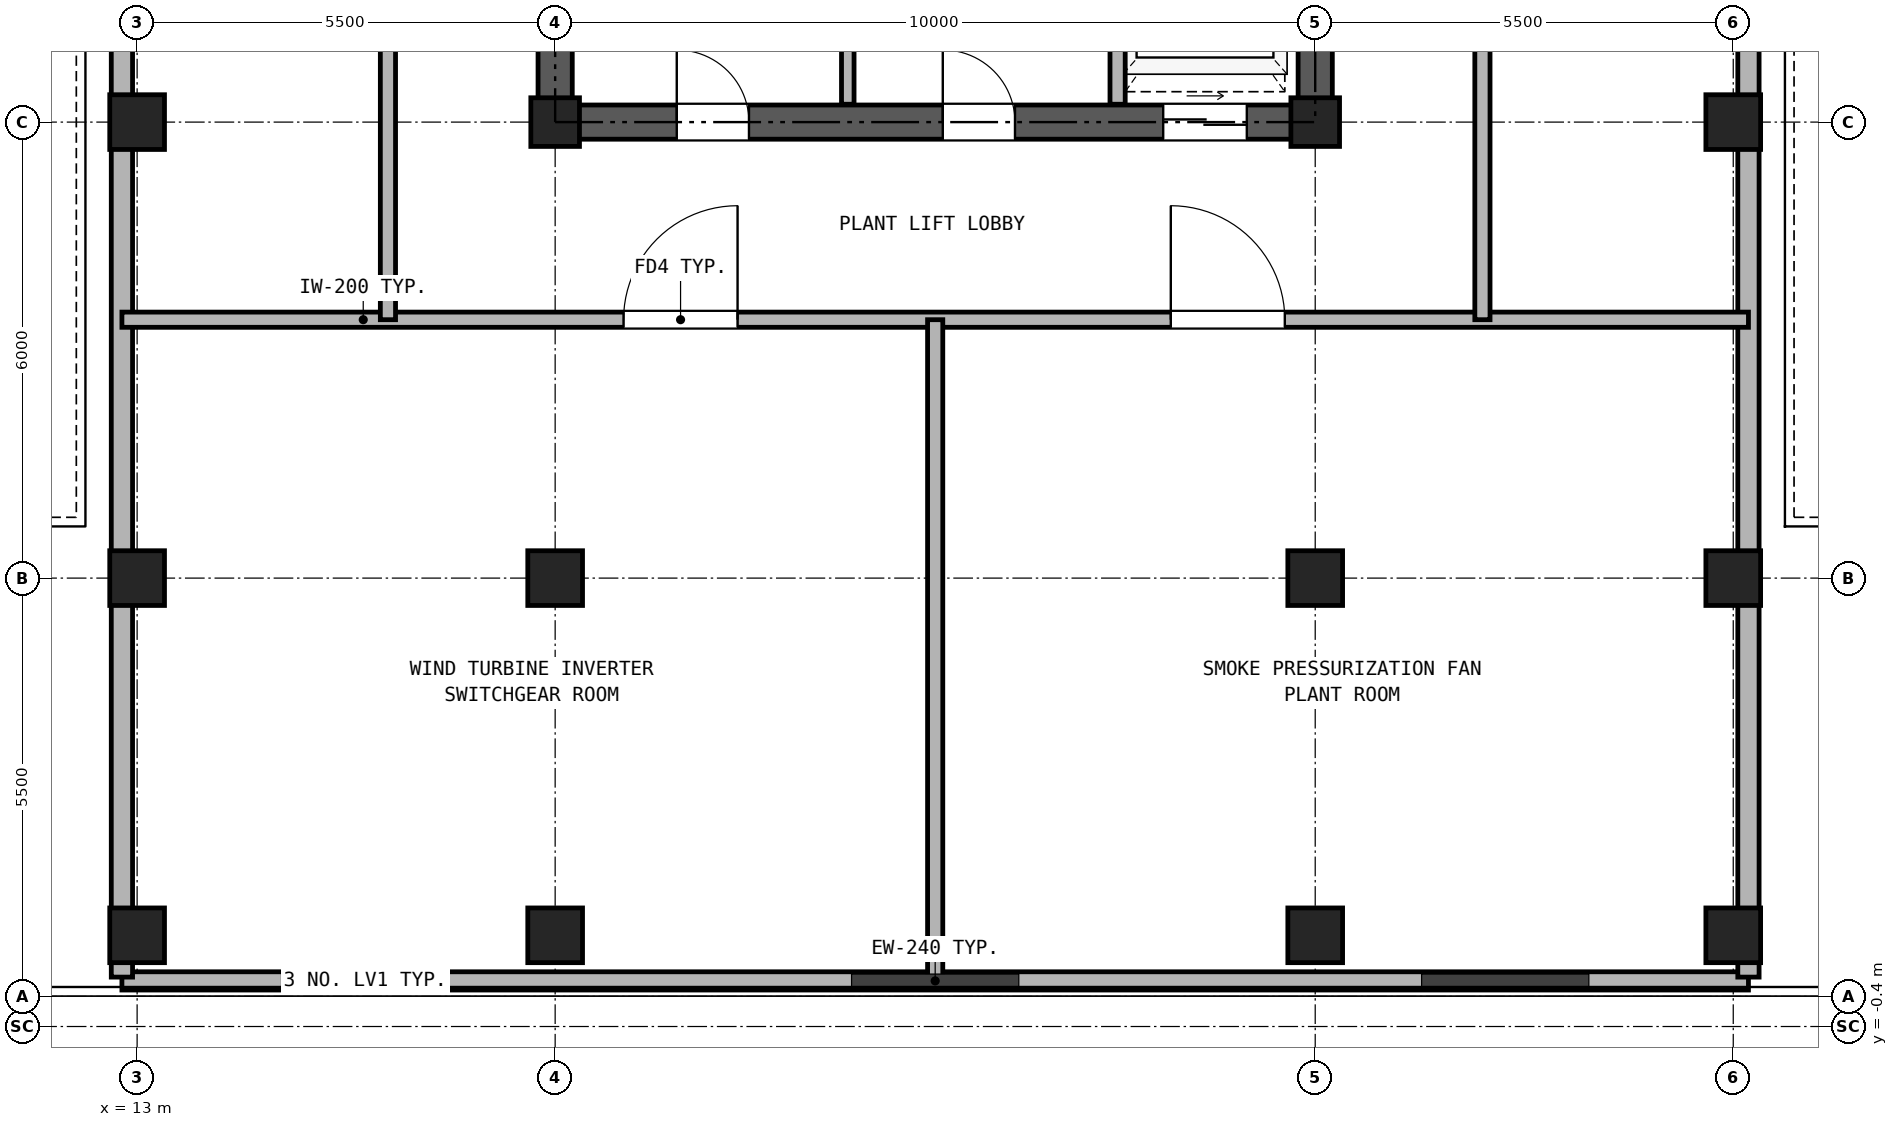
"""IFC4 building model, lengths in metres.
Left out: names, types, materials, properties, quantities, classifications, styles, units other than length and angle.
Written with IfcOpenShell. Run it as: python <this file> out.ifc"""

import sys

from ifc_helpers import new_model, si_unit, direction, frame, frame_2d, origin, origin_2d, place, context, subcontext, project, spatial, rectangle, hollow_rectangle, extrude, source, transform, mapped, element, fill, save


model = new_model("IFC4")
c1 = context("Model", 3, precision=1e-05, world=origin(), true_north=direction((0.0, 1.0)))
c2 = subcontext(c1, "Body", "Model", "MODEL_VIEW")
j1 = project(units=[si_unit("LENGTHUNIT", "METRE"), si_unit("PLANEANGLEUNIT", "RADIAN")], contexts=[c1])
p1 = place(None, origin())
s1 = spatial("IfcSite", under=j1, at=p1, CompositionType="ELEMENT")
p2 = place(p1, origin())
s2 = spatial("IfcBuilding", under=s1, at=p2, CompositionType="ELEMENT")
p3 = place(p2, frame((0.0, 0.0, 188.1)))
s3 = spatial("IfcBuildingStorey", under=s2, at=p3, CompositionType="ELEMENT", Elevation=188.1)
m1 = source(origin(), c2, "Body", "SweptSolid", [
    extrude(hollow_rectangle(XDim=0.72, YDim=0.72, WallThickness=0.04, at=origin_2d()), origin(), (0.0, 0.0, 1.0), 4.85),
])
for number, where, z_axis, x_axis in (
    (1, (13.0, 0.8, 0.0), (0.0, 0.0, 1.0), (1.0, 0.0, 0.0)),
    (2, (18.5, 0.8, 0.0), (0.0, 0.0, 1.0), (1.0, 0.0, 0.0)),
    (3, (28.5, 0.8, 0.0), (0.0, 0.0, 1.0), (1.0, 0.0, 0.0)),
    (4, (34.0, 0.8, 0.0), (0.0, 0.0, 1.0), (1.0, 0.0, 0.0)),
    (5, (13.0, 5.5, 0.0), (0.0, 0.0, 1.0), (1.0, 0.0, 0.0)),
    (6, (13.0, 11.5, 0.0), (0.0, 0.0, 1.0), (1.0, 0.0, 0.0)),
    (7, (18.5, 5.5, 0.0), (0.0, 0.0, 1.0), (1.0, 0.0, 0.0)),
):
    element("IfcColumn", number, at=place(p3, frame(where, z_axis=z_axis, x_axis=x_axis)), inside=s3, PredefinedType="COLUMN", context=c2, shape_type="MappedRepresentation", body=[
        mapped(m1, transform((0.0, 0.0, 0.0), x_axis=(1.0, 0.0, 0.0), y_axis=(0.0, 1.0, 0.0), z_axis=(0.0, 0.0, 1.0), scale=1.0)),
    ])
m2 = source(origin(), c2, "Body", "SweptSolid", [
    extrude(hollow_rectangle(XDim=0.64, YDim=0.64, WallThickness=0.035, at=origin_2d()), origin(), (0.0, 0.0, 1.0), 4.85),
])
p4 = place(p3, frame((18.5, 11.5, 0.0), z_axis=(0.0, 0.0, 1.0), x_axis=(1.0, 0.0, 0.0)))
e8 = element("IfcColumn", 8, at=p4, inside=s3, PredefinedType="COLUMN", context=c2, shape_type="MappedRepresentation", body=[
    mapped(m2, transform((0.0, 0.0, 0.0), x_axis=(1.0, 0.0, 0.0), y_axis=(0.0, 1.0, 0.0), z_axis=(0.0, 0.0, 1.0), scale=1.0)),
])
p5 = place(p3, frame((28.5, 5.5, 0.0), z_axis=(0.0, 0.0, 1.0), x_axis=(1.0, 0.0, 0.0)))
e9 = element("IfcColumn", 9, at=p5, inside=s3, PredefinedType="COLUMN", context=c2, shape_type="MappedRepresentation", body=[
    mapped(m1, transform((0.0, 0.0, 0.0), x_axis=(1.0, 0.0, 0.0), y_axis=(0.0, 1.0, 0.0), z_axis=(0.0, 0.0, 1.0), scale=1.0)),
])
p6 = place(p3, frame((28.5, 11.5, 0.0), z_axis=(0.0, 0.0, 1.0), x_axis=(1.0, 0.0, 0.0)))
e10 = element("IfcColumn", 10, at=p6, inside=s3, PredefinedType="COLUMN", context=c2, shape_type="MappedRepresentation", body=[
    mapped(m2, transform((0.0, 0.0, 0.0), x_axis=(1.0, 0.0, 0.0), y_axis=(0.0, 1.0, 0.0), z_axis=(0.0, 0.0, 1.0), scale=1.0)),
])
for number, where, z_axis, x_axis in (
    (11, (34.0, 5.5, 0.0), (0.0, 0.0, 1.0), (1.0, 0.0, 0.0)),
    (12, (34.0, 11.5, 0.0), (0.0, 0.0, 1.0), (1.0, 0.0, 0.0)),
):
    element("IfcColumn", number, at=place(p3, frame(where, z_axis=z_axis, x_axis=x_axis)), inside=s3, PredefinedType="COLUMN", context=c2, shape_type="MappedRepresentation", body=[
        mapped(m1, transform((0.0, 0.0, 0.0), x_axis=(1.0, 0.0, 0.0), y_axis=(0.0, 1.0, 0.0), z_axis=(0.0, 0.0, 1.0), scale=1.0)),
    ])
p7 = place(p3, frame((12.8, 0.2, 0.0), z_axis=(0.0, 0.0, 1.0), x_axis=(1.0, 0.0, 0.0)))
e13 = element("IfcWall", 13, at=p7, inside=s3, PredefinedType="SOLIDWALL", context=c2, shape_type="SweptSolid", body=[
    extrude(rectangle(XDim=21.4, YDim=0.24, at=frame_2d((10.7, 0.0))), origin(), (0.0, 0.0, 1.0), 4.85),
])
p8 = place(p3, frame((18.275, 11.5, 0.0), z_axis=(0.0, 0.0, 1.0), x_axis=(1.0, 0.0, 0.0)))
e14 = element("IfcWall", 14, at=p8, inside=s3, PredefinedType="SHEAR", context=c2, shape_type="SweptSolid", body=[
    extrude(rectangle(XDim=10.45, YDim=0.45, at=frame_2d((5.225, 0.0))), origin(), (0.0, 0.0, 1.0), 4.85),
])
p9 = place(p8, frame((1.825, 0.0, 0.0)))
e15 = element("IfcOpeningElement", 15, at=p9, cuts=e14, PredefinedType="OPENING", context=c2, shape_type="SweptSolid", body=[
    extrude(rectangle(XDim=0.95, YDim=2.15, at=frame_2d((0.475, 1.075))), frame((0.0, 0.235, 0.0), z_axis=(0.0, -1.0, 0.0), x_axis=(1.0, 0.0, 0.0)), (0.0, 0.0, 1.0), 0.47),
])
p10 = place(p8, frame((5.325, 0.0, 0.0)))
e16 = element("IfcOpeningElement", 16, at=p10, cuts=e14, PredefinedType="OPENING", context=c2, shape_type="SweptSolid", body=[
    extrude(rectangle(XDim=0.95, YDim=2.15, at=frame_2d((0.475, 1.075))), frame((0.0, 0.235, 0.0), z_axis=(0.0, -1.0, 0.0), x_axis=(1.0, 0.0, 0.0)), (0.0, 0.0, 1.0), 0.47),
])
p11 = place(p8, frame((8.225, 0.0, 0.0)))
e17 = element("IfcOpeningElement", 17, at=p11, cuts=e14, PredefinedType="OPENING", context=c2, shape_type="SweptSolid", body=[
    extrude(rectangle(XDim=1.1, YDim=2.25, at=frame_2d((0.55, 1.125))), frame((0.0, 0.235, 0.0), z_axis=(0.0, -1.0, 0.0), x_axis=(1.0, 0.0, 0.0)), (0.0, 0.0, 1.0), 0.47),
])
p12 = place(p3, frame((18.5, 11.725, 0.0), z_axis=(0.0, 0.0, 1.0), x_axis=(0.0, 1.0, 0.0)))
e18 = element("IfcWall", 18, at=p12, inside=s3, PredefinedType="SHEAR", context=c2, shape_type="SweptSolid", body=[
    extrude(rectangle(XDim=16.8, YDim=0.45, at=frame_2d((8.4, 0.0))), origin(), (0.0, 0.0, 1.0), 4.85),
])
p13 = place(p12, frame((7.425, 0.0, 0.0)))
e19 = element("IfcOpeningElement", 19, at=p13, cuts=e18, PredefinedType="OPENING", context=c2, shape_type="SweptSolid", body=[
    extrude(rectangle(XDim=1.15, YDim=2.2, at=frame_2d((0.575, 1.1))), frame((0.0, 0.235, 0.0), z_axis=(0.0, -1.0, 0.0), x_axis=(1.0, 0.0, 0.0)), (0.0, 0.0, 1.0), 0.47),
])
p14 = place(p3, frame((28.5, 11.725, 0.0), z_axis=(0.0, 0.0, 1.0), x_axis=(0.0, 1.0, 0.0)))
e20 = element("IfcWall", 20, at=p14, inside=s3, PredefinedType="SHEAR", context=c2, shape_type="SweptSolid", body=[
    extrude(rectangle(XDim=16.8, YDim=0.45, at=frame_2d((8.4, 0.0))), origin(), (0.0, 0.0, 1.0), 4.85),
])
p15 = place(p14, frame((7.425, 0.0, 0.0)))
e21 = element("IfcOpeningElement", 21, at=p15, cuts=e20, PredefinedType="OPENING", context=c2, shape_type="SweptSolid", body=[
    extrude(rectangle(XDim=1.15, YDim=2.2, at=frame_2d((0.575, 1.1))), frame((0.0, 0.235, 0.0), z_axis=(0.0, -1.0, 0.0), x_axis=(1.0, 0.0, 0.0)), (0.0, 0.0, 1.0), 0.47),
])
p16 = place(p3, frame((22.35, 11.735, 0.0), z_axis=(0.0, 0.0, 1.0), x_axis=(0.0, 1.0, 0.0)))
e22 = element("IfcWall", 22, at=p16, inside=s3, PredefinedType="PARTITIONING", context=c2, shape_type="SweptSolid", body=[
    extrude(rectangle(XDim=3.265, YDim=0.165, at=frame_2d((1.632, 0.0))), origin(), (0.0, 0.0, 1.0), 4.85),
])
p17 = place(p3, frame((25.9, 11.735, 0.0), z_axis=(0.0, 0.0, 1.0), x_axis=(0.0, 1.0, 0.0)))
e23 = element("IfcWall", 23, at=p17, inside=s3, PredefinedType="PARTITIONING", context=c2, shape_type="SweptSolid", body=[
    extrude(rectangle(XDim=3.265, YDim=0.2, at=frame_2d((1.632, 0.0))), origin(), (0.0, 0.0, 1.0), 4.85),
])
for number, where, z_axis, x_axis in (
    (24, (12.8, 0.25, 0.0), (0.0, 0.0, 1.0), (0.0, 1.0, 0.0)),
    (25, (34.2, 0.25, 0.0), (0.0, 0.0, 1.0), (0.0, 1.0, 0.0)),
):
    element("IfcWall", number, at=place(p3, frame(where, z_axis=z_axis, x_axis=x_axis)), inside=s3, PredefinedType="SOLIDWALL", context=c2, shape_type="SweptSolid", body=[
        extrude(rectangle(XDim=34.8, YDim=0.28, at=frame_2d((17.4, 0.0))), origin(), (0.0, 0.0, 1.0), 4.223),
    ])
p18 = place(p3, frame((12.8, 8.9, 0.0), z_axis=(0.0, 0.0, 1.0), x_axis=(1.0, 0.0, 0.0)))
e26 = element("IfcWall", 26, at=p18, inside=s3, PredefinedType="PARTITIONING", context=c2, shape_type="SweptSolid", body=[
    extrude(rectangle(XDim=21.4, YDim=0.2, at=frame_2d((10.7, 0.0))), origin(), (0.0, 0.0, 1.0), 4.85),
])
p19 = place(p18, frame((6.6, 0.0, 0.0)))
e27 = element("IfcOpeningElement", 27, at=p19, cuts=e26, PredefinedType="OPENING", context=c2, shape_type="SweptSolid", body=[
    extrude(rectangle(XDim=1.5, YDim=2.25, at=frame_2d((0.75, 1.125))), frame((0.0, 0.11, 0.0), z_axis=(0.0, -1.0, 0.0), x_axis=(1.0, 0.0, 0.0)), (0.0, 0.0, 1.0), 0.22),
])
p20 = place(p18, frame((13.8, 0.0, 0.0)))
e28 = element("IfcOpeningElement", 28, at=p20, cuts=e26, PredefinedType="OPENING", context=c2, shape_type="SweptSolid", body=[
    extrude(rectangle(XDim=1.5, YDim=2.25, at=frame_2d((0.75, 1.125))), frame((0.0, 0.11, 0.0), z_axis=(0.0, -1.0, 0.0), x_axis=(1.0, 0.0, 0.0)), (0.0, 0.0, 1.0), 0.22),
])
p21 = place(p3, frame((16.3, 8.9, 0.0), z_axis=(0.0, 0.0, 1.0), x_axis=(0.0, 1.0, 0.0)))
e29 = element("IfcWall", 29, at=p21, inside=s3, PredefinedType="PARTITIONING", context=c2, shape_type="SweptSolid", body=[
    extrude(rectangle(XDim=19.85, YDim=0.2, at=frame_2d((9.925, 0.0))), origin(), (0.0, 0.0, 1.0), 4.85),
])
p22 = place(p21, frame((10.6, 0.0, 0.0)))
e30 = element("IfcOpeningElement", 30, at=p22, cuts=e29, PredefinedType="OPENING", context=c2, shape_type="SweptSolid", body=[
    extrude(rectangle(XDim=1.05, YDim=2.15, at=frame_2d((0.525, 1.075))), frame((0.0, 0.11, 0.0), z_axis=(0.0, -1.0, 0.0), x_axis=(1.0, 0.0, 0.0)), (0.0, 0.0, 1.0), 0.22),
])
p23 = place(p3, frame((30.7, 8.9, 0.0), z_axis=(0.0, 0.0, 1.0), x_axis=(0.0, 1.0, 0.0)))
e31 = element("IfcWall", 31, at=p23, inside=s3, PredefinedType="PARTITIONING", context=c2, shape_type="SweptSolid", body=[
    extrude(rectangle(XDim=19.85, YDim=0.2, at=frame_2d((9.925, 0.0))), origin(), (0.0, 0.0, 1.0), 4.85),
])
p24 = place(p23, frame((10.6, 0.0, 0.0)))
e32 = element("IfcOpeningElement", 32, at=p24, cuts=e31, PredefinedType="OPENING", context=c2, shape_type="SweptSolid", body=[
    extrude(rectangle(XDim=1.05, YDim=2.15, at=frame_2d((0.525, 1.075))), frame((0.0, 0.11, 0.0), z_axis=(0.0, -1.0, 0.0), x_axis=(1.0, 0.0, 0.0)), (0.0, 0.0, 1.0), 0.22),
])
p25 = place(p3, frame((23.5, 0.25, 0.0), z_axis=(0.0, 0.0, 1.0), x_axis=(0.0, 1.0, 0.0)))
e33 = element("IfcWall", 33, at=p25, inside=s3, PredefinedType="PARTITIONING", context=c2, shape_type="SweptSolid", body=[
    extrude(rectangle(XDim=8.65, YDim=0.2, at=frame_2d((4.325, 0.0))), origin(), (0.0, 0.0, 1.0), 4.85),
])
p26 = place(p9, frame((0.95, 0.0, 0.0), z_axis=(0.0, 0.0, 1.0), x_axis=(-1.0, 0.0, 0.0)))
e34 = element("IfcDoor", 34, at=p26, inside=s3, OperationType="SINGLE_SWING_LEFT", PredefinedType="DOOR", context=c2, shape_type="SweptSolid", body=[
    extrude(rectangle(XDim=0.95, YDim=2.15, at=frame_2d((0.475, 1.075))), frame((0.0, 0.025, 0.0), z_axis=(0.0, -1.0, 0.0), x_axis=(1.0, 0.0, 0.0)), (0.0, 0.0, 1.0), 0.05),
])
fill(e15, e34)
p27 = place(p10, frame((0.95, 0.0, 0.0), z_axis=(0.0, 0.0, 1.0), x_axis=(-1.0, 0.0, 0.0)))
e35 = element("IfcDoor", 35, at=p27, inside=s3, OperationType="SINGLE_SWING_LEFT", PredefinedType="DOOR", context=c2, shape_type="SweptSolid", body=[
    extrude(rectangle(XDim=0.95, YDim=2.15, at=frame_2d((0.475, 1.075))), frame((0.0, 0.025, 0.0), z_axis=(0.0, -1.0, 0.0), x_axis=(1.0, 0.0, 0.0)), (0.0, 0.0, 1.0), 0.05),
])
fill(e16, e35)
p28 = place(p11, frame((1.1, 0.0, 0.0), z_axis=(0.0, 0.0, 1.0), x_axis=(-1.0, 0.0, 0.0)))
e36 = element("IfcDoor", 36, at=p28, inside=s3, OperationType="DOUBLE_DOOR_SLIDING", PredefinedType="DOOR", context=c2, shape_type="SweptSolid", body=[
    extrude(rectangle(XDim=1.1, YDim=2.25, at=frame_2d((0.55, 1.125))), frame((0.0, 0.025, 0.0), z_axis=(0.0, -1.0, 0.0), x_axis=(1.0, 0.0, 0.0)), (0.0, 0.0, 1.0), 0.05),
])
fill(e17, e36)
p29 = place(p19, frame((1.5, 0.0, 0.0), z_axis=(0.0, 0.0, 1.0), x_axis=(-1.0, 0.0, 0.0)))
e37 = element("IfcDoor", 37, at=p29, inside=s3, OperationType="SINGLE_SWING_RIGHT", PredefinedType="DOOR", context=c2, shape_type="SweptSolid", body=[
    extrude(rectangle(XDim=1.5, YDim=2.25, at=frame_2d((0.75, 1.125))), frame((0.0, 0.025, 0.0), z_axis=(0.0, -1.0, 0.0), x_axis=(1.0, 0.0, 0.0)), (0.0, 0.0, 1.0), 0.05),
])
fill(e27, e37)
p30 = place(p20, frame((1.5, 0.0, 0.0), z_axis=(0.0, 0.0, 1.0), x_axis=(-1.0, 0.0, 0.0)))
e38 = element("IfcDoor", 38, at=p30, inside=s3, OperationType="SINGLE_SWING_LEFT", PredefinedType="DOOR", context=c2, shape_type="SweptSolid", body=[
    extrude(rectangle(XDim=1.5, YDim=2.25, at=frame_2d((0.75, 1.125))), frame((0.0, 0.025, 0.0), z_axis=(0.0, -1.0, 0.0), x_axis=(1.0, 0.0, 0.0)), (0.0, 0.0, 1.0), 0.05),
])
fill(e28, e38)
save(model, sys.argv[1])
